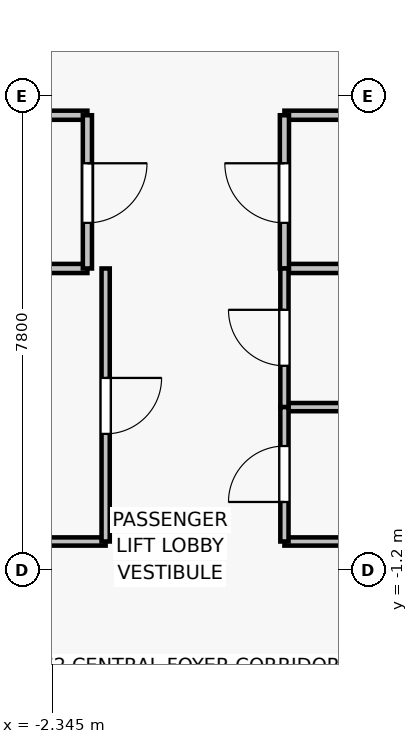
"""IFC4 building model, lengths in metres.
Left out: names, types, materials, properties, quantities, classifications, styles, units other than length and angle.
Written with IfcOpenShell. Run it as: python <this file> out.ifc"""

import sys

from ifc_helpers import new_model, si_unit, direction, frame, frame_2d, origin, place, context, subcontext, project, spatial, rectangle, extrude, source, transform, mapped, element, fill, save


model = new_model("IFC4")
c1 = context("Model", 3, precision=1e-05, world=origin(), true_north=direction((0.0, 1.0)))
c2 = subcontext(c1, "Body", "Model", "MODEL_VIEW")
j1 = project(units=[si_unit("LENGTHUNIT", "METRE"), si_unit("PLANEANGLEUNIT", "RADIAN")], contexts=[c1])
p1 = place(None, origin())
s1 = spatial("IfcSite", under=j1, at=p1, CompositionType="ELEMENT")
p2 = place(p1, origin())
s2 = spatial("IfcBuilding", under=s1, at=p2, CompositionType="ELEMENT")
p3 = place(p2, frame((0.0, 0.0, 255.1)))
s3 = spatial("IfcBuildingStorey", under=s2, at=p3, CompositionType="ELEMENT", Elevation=255.1)
for number, where, z_axis, x_axis in (
    (1, (-1.77, 3.76, 0.0), (0.0, 0.0, 1.0), (-1.0, 0.0, 0.0)),
    (2, (-6.18, 6.28, 0.0), (0.0, 0.0, 1.0), (1.0, 0.0, 0.0)),
):
    element("IfcWall", number, at=place(p3, frame(where, z_axis=z_axis, x_axis=x_axis)), inside=s3, PredefinedType="PARTITIONING", context=c2, shape_type="SweptSolid", body=[
        extrude(rectangle(XDim=4.41, YDim=0.15, at=frame_2d((2.205, 0.0))), origin(), (0.0, 0.0, 1.0), 3.075),
    ])
p4 = place(p3, frame((-1.77, 6.28, 0.0), z_axis=(0.0, 0.0, 1.0), x_axis=(0.0, -1.0, 0.0)))
e3 = element("IfcWall", 3, at=p4, inside=s3, PredefinedType="PARTITIONING", context=c2, shape_type="SweptSolid", body=[
    extrude(rectangle(XDim=2.52, YDim=0.15, at=frame_2d((1.26, 0.0))), origin(), (0.0, 0.0, 1.0), 3.075),
])
p5 = place(p4, frame((0.79, 0.0, 0.0)))
e4 = element("IfcOpeningElement", 4, at=p5, cuts=e3, PredefinedType="OPENING", context=c2, shape_type="SweptSolid", body=[
    extrude(rectangle(XDim=0.98, YDim=2.15, at=frame_2d((0.49, 1.075))), frame((0.0, 0.085, 0.0), z_axis=(0.0, -1.0, 0.0), x_axis=(1.0, 0.0, 0.0)), (0.0, 0.0, 1.0), 0.17),
])
for number, where, z_axis, x_axis in (
    (5, (6.38, 3.76, 0.0), (0.0, 0.0, 1.0), (-1.0, 0.0, 0.0)),
    (6, (1.47, 6.28, 0.0), (0.0, 0.0, 1.0), (1.0, 0.0, 0.0)),
):
    element("IfcWall", number, at=place(p3, frame(where, z_axis=z_axis, x_axis=x_axis)), inside=s3, PredefinedType="PARTITIONING", context=c2, shape_type="SweptSolid", body=[
        extrude(rectangle(XDim=4.91, YDim=0.15, at=frame_2d((2.455, 0.0))), origin(), (0.0, 0.0, 1.0), 3.075),
    ])
p6 = place(p3, frame((1.47, 3.76, 0.0), z_axis=(0.0, 0.0, 1.0), x_axis=(0.0, 1.0, 0.0)))
e7 = element("IfcWall", 7, at=p6, inside=s3, PredefinedType="PARTITIONING", context=c2, shape_type="SweptSolid", body=[
    extrude(rectangle(XDim=2.52, YDim=0.15, at=frame_2d((1.26, 0.0))), origin(), (0.0, 0.0, 1.0), 3.075),
])
p7 = place(p6, frame((0.75, 0.0, 0.0)))
e8 = element("IfcOpeningElement", 8, at=p7, cuts=e7, PredefinedType="OPENING", context=c2, shape_type="SweptSolid", body=[
    extrude(rectangle(XDim=0.98, YDim=2.15, at=frame_2d((0.49, 1.075))), frame((0.0, 0.085, 0.0), z_axis=(0.0, -1.0, 0.0), x_axis=(1.0, 0.0, 0.0)), (0.0, 0.0, 1.0), 0.17),
])
p8 = place(p3, frame((-1.47, -0.73, 0.0), z_axis=(0.0, 0.0, 1.0), x_axis=(-1.0, 0.0, 0.0)))
e9 = element("IfcWall", 9, at=p8, inside=s3, PredefinedType="PARTITIONING", context=c2, shape_type="SweptSolid", body=[
    extrude(rectangle(XDim=5.11, YDim=0.135, at=frame_2d((2.555, 0.0))), origin(), (0.0, 0.0, 1.0), 3.075),
])
p9 = place(p3, frame((-1.47, 3.76, 0.0), z_axis=(0.0, 0.0, 1.0), x_axis=(0.0, -1.0, 0.0)))
e10 = element("IfcWall", 10, at=p9, inside=s3, PredefinedType="PARTITIONING", context=c2, shape_type="SweptSolid", body=[
    extrude(rectangle(XDim=4.49, YDim=0.135, at=frame_2d((2.245, 0.0))), origin(), (0.0, 0.0, 1.0), 3.075),
])
p10 = place(p9, frame((1.8, 0.0, 0.0)))
e11 = element("IfcOpeningElement", 11, at=p10, cuts=e10, PredefinedType="OPENING", context=c2, shape_type="SweptSolid", body=[
    extrude(rectangle(XDim=0.92, YDim=2.1, at=frame_2d((0.46, 1.05))), frame((0.0, 0.077, 0.0), z_axis=(0.0, -1.0, 0.0), x_axis=(1.0, 0.0, 0.0)), (0.0, 0.0, 1.0), 0.155),
])
p11 = place(p3, frame((6.58, 1.48, 0.0), z_axis=(0.0, 0.0, 1.0), x_axis=(-1.0, 0.0, 0.0)))
e12 = element("IfcWall", 12, at=p11, inside=s3, PredefinedType="PARTITIONING", context=c2, shape_type="SweptSolid", body=[
    extrude(rectangle(XDim=5.11, YDim=0.135, at=frame_2d((2.555, 0.0))), origin(), (0.0, 0.0, 1.0), 3.075),
])
p12 = place(p3, frame((1.47, 1.48, 0.0), z_axis=(0.0, 0.0, 1.0), x_axis=(0.0, 1.0, 0.0)))
e13 = element("IfcWall", 13, at=p12, inside=s3, PredefinedType="PARTITIONING", context=c2, shape_type="SweptSolid", body=[
    extrude(rectangle(XDim=2.28, YDim=0.135, at=frame_2d((1.14, 0.0))), origin(), (0.0, 0.0, 1.0), 3.075),
])
p13 = place(p12, frame((0.68, 0.0, 0.0)))
e14 = element("IfcOpeningElement", 14, at=p13, cuts=e13, PredefinedType="OPENING", context=c2, shape_type="SweptSolid", body=[
    extrude(rectangle(XDim=0.92, YDim=2.1, at=frame_2d((0.46, 1.05))), frame((0.0, 0.077, 0.0), z_axis=(0.0, -1.0, 0.0), x_axis=(1.0, 0.0, 0.0)), (0.0, 0.0, 1.0), 0.155),
])
p14 = place(p3, frame((4.18, -0.73, 0.0), z_axis=(0.0, 0.0, 1.0), x_axis=(-1.0, 0.0, 0.0)))
e15 = element("IfcWall", 15, at=p14, inside=s3, PredefinedType="PARTITIONING", context=c2, shape_type="SweptSolid", body=[
    extrude(rectangle(XDim=2.71, YDim=0.135, at=frame_2d((1.355, 0.0))), origin(), (0.0, 0.0, 1.0), 3.075),
])
p15 = place(p3, frame((1.47, -0.73, 0.0), z_axis=(0.0, 0.0, 1.0), x_axis=(0.0, 1.0, 0.0)))
e16 = element("IfcWall", 16, at=p15, inside=s3, PredefinedType="PARTITIONING", context=c2, shape_type="SweptSolid", body=[
    extrude(rectangle(XDim=2.21, YDim=0.135, at=frame_2d((1.105, 0.0))), origin(), (0.0, 0.0, 1.0), 3.075),
])
p16 = place(p15, frame((0.65, 0.0, 0.0)))
e17 = element("IfcOpeningElement", 17, at=p16, cuts=e16, PredefinedType="OPENING", context=c2, shape_type="SweptSolid", body=[
    extrude(rectangle(XDim=0.92, YDim=2.1, at=frame_2d((0.46, 1.05))), frame((0.0, 0.077, 0.0), z_axis=(0.0, -1.0, 0.0), x_axis=(1.0, 0.0, 0.0)), (0.0, 0.0, 1.0), 0.155),
])
m1 = source(origin(), c2, "Body", "SweptSolid", [
    extrude(rectangle(XDim=0.98, YDim=2.15, at=frame_2d((0.49, 1.075))), frame((0.0, 0.025, 0.0), z_axis=(0.0, -1.0, 0.0), x_axis=(1.0, 0.0, 0.0)), (0.0, 0.0, 1.0), 0.05),
])
p17 = place(p5, origin())
e18 = element("IfcDoor", 18, at=p17, inside=s3, OperationType="SINGLE_SWING_LEFT", PredefinedType="DOOR", context=c2, shape_type="MappedRepresentation", body=[
    mapped(m1, transform((0.0, 0.0, 0.0), x_axis=(1.0, 0.0, 0.0), y_axis=(0.0, 1.0, 0.0), z_axis=(0.0, 0.0, 1.0), scale=1.0)),
])
fill(e4, e18)
p18 = place(p7, origin())
e19 = element("IfcDoor", 19, at=p18, inside=s3, OperationType="SINGLE_SWING_RIGHT", PredefinedType="DOOR", context=c2, shape_type="MappedRepresentation", body=[
    mapped(m1, transform((0.0, 0.0, 0.0), x_axis=(1.0, 0.0, 0.0), y_axis=(0.0, 1.0, 0.0), z_axis=(0.0, 0.0, 1.0), scale=1.0)),
])
fill(e8, e19)
m2 = source(origin(), c2, "Body", "SweptSolid", [
    extrude(rectangle(XDim=0.92, YDim=2.1, at=frame_2d((0.46, 1.05))), frame((0.0, 0.025, 0.0), z_axis=(0.0, -1.0, 0.0), x_axis=(1.0, 0.0, 0.0)), (0.0, 0.0, 1.0), 0.05),
])
p19 = place(p10, origin())
e20 = element("IfcDoor", 20, at=p19, inside=s3, OperationType="SINGLE_SWING_LEFT", PredefinedType="DOOR", context=c2, shape_type="MappedRepresentation", body=[
    mapped(m2, transform((0.0, 0.0, 0.0), x_axis=(1.0, 0.0, 0.0), y_axis=(0.0, 1.0, 0.0), z_axis=(0.0, 0.0, 1.0), scale=1.0)),
])
fill(e11, e20)
p20 = place(p13, origin())
e21 = element("IfcDoor", 21, at=p20, inside=s3, OperationType="SINGLE_SWING_RIGHT", PredefinedType="DOOR", context=c2, shape_type="MappedRepresentation", body=[
    mapped(m2, transform((0.0, 0.0, 0.0), x_axis=(1.0, 0.0, 0.0), y_axis=(0.0, 1.0, 0.0), z_axis=(0.0, 0.0, 1.0), scale=1.0)),
])
fill(e14, e21)
p21 = place(p16, origin())
e22 = element("IfcDoor", 22, at=p21, inside=s3, OperationType="SINGLE_SWING_LEFT", PredefinedType="DOOR", context=c2, shape_type="MappedRepresentation", body=[
    mapped(m2, transform((0.0, 0.0, 0.0), x_axis=(1.0, 0.0, 0.0), y_axis=(0.0, 1.0, 0.0), z_axis=(0.0, 0.0, 1.0), scale=1.0)),
])
fill(e17, e22)
save(model, sys.argv[1])
